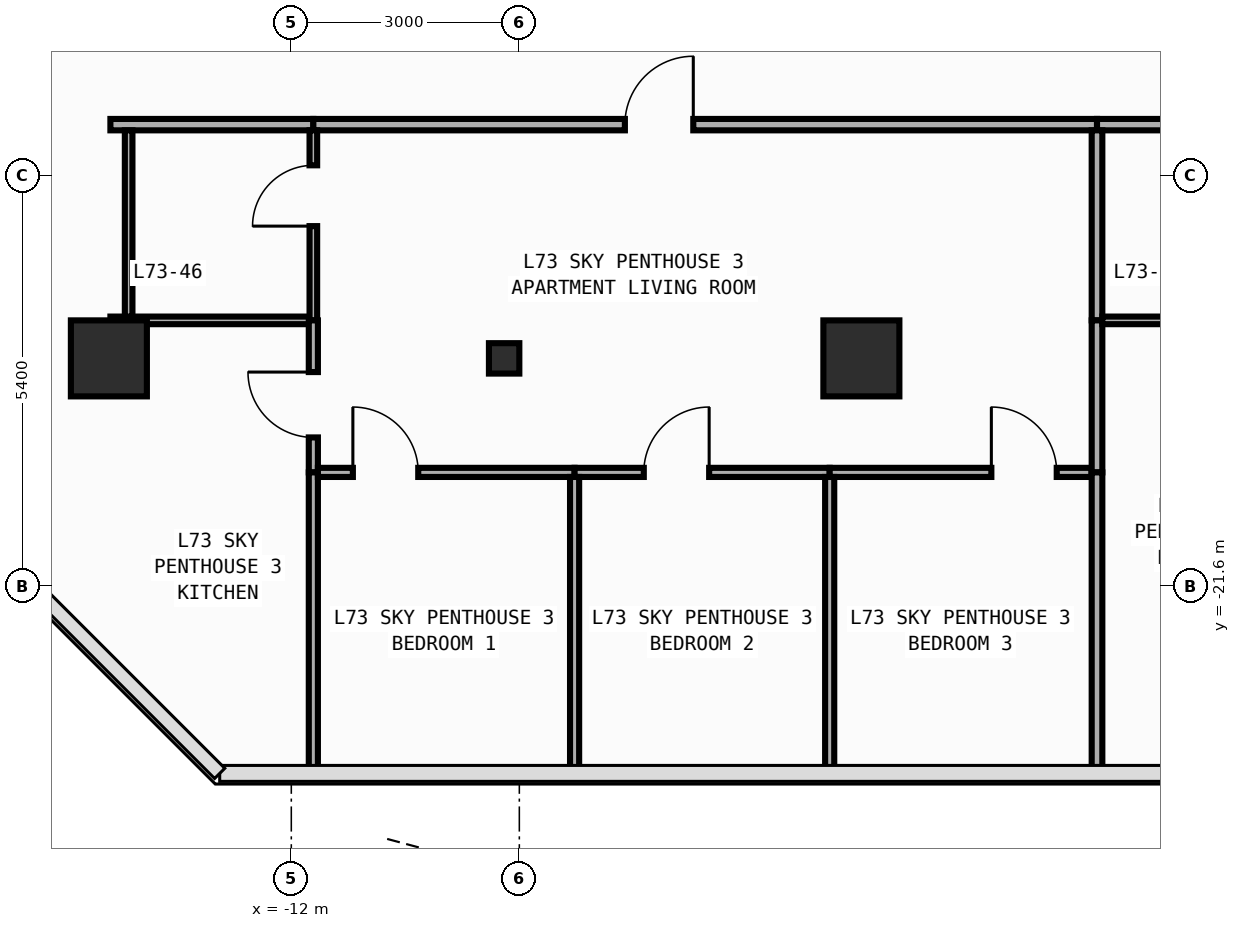
"""IFC4 building model, lengths in metres.
Left out: names, types, materials, properties, quantities, classifications, styles, units other than length and angle.
Written with IfcOpenShell. Run it as: python <this file> out.ifc"""

import sys

from ifc_helpers import new_model, si_unit, direction, frame, frame_2d, origin, origin_2d, place, context, subcontext, project, spatial, rectangle, circle, i_section, extrude, element, fill, save


model = new_model("IFC4")
c1 = context("Model", 3, precision=1e-05, world=origin(), true_north=direction((0.0, 1.0)))
c2 = subcontext(c1, "Body", "Model", "MODEL_VIEW")
j1 = project(units=[si_unit("LENGTHUNIT", "METRE"), si_unit("PLANEANGLEUNIT", "RADIAN")], contexts=[c1])
p1 = place(None, origin())
s1 = spatial("IfcSite", under=j1, at=p1, CompositionType="ELEMENT")
p2 = place(p1, origin())
s2 = spatial("IfcBuilding", under=s1, at=p2, CompositionType="ELEMENT")
p3 = place(p2, frame((0.0, 0.0, 304.2)))
s3 = spatial("IfcBuildingStorey", under=s2, at=p3, CompositionType="ELEMENT", Elevation=304.2)
p4 = place(p3, frame((-9.2, -18.6, 0.0), z_axis=(0.0, 0.0, 1.0), x_axis=(1.0, 0.0, 0.0)))
e1 = element("IfcColumn", 1, at=p4, inside=s3, PredefinedType="COLUMN", context=c2, shape_type="SweptSolid", body=[
    extrude(i_section(OverallWidth=0.4, OverallDepth=0.4, WebThickness=0.013, FlangeThickness=0.021, FilletRadius=0.022, at=origin_2d()), origin(), (0.0, 0.0, 1.0), 3.8),
])
for number, where, z_axis, x_axis in (
    (2, (-14.4, -18.6, 0.0), (0.0, 0.0, 1.0), (1.0, 0.0, 0.0)),
    (3, (-4.5, -18.6, 0.0), (0.0, 0.0, 1.0), (1.0, 0.0, 0.0)),
):
    element("IfcColumn", number, at=place(p3, frame(where, z_axis=z_axis, x_axis=x_axis)), inside=s3, PredefinedType="COLUMN", context=c2, shape_type="SweptSolid", body=[
        extrude(circle(Radius=0.5, at=origin_2d()), origin(), (0.0, 0.0, 1.0), 3.8),
    ])
p5 = place(p3, frame((-14.38, -15.525, 0.0), z_axis=(0.0, 0.0, 1.0), x_axis=(1.0, 0.0, 0.0)))
e4 = element("IfcWall", 4, at=p5, inside=s3, PredefinedType="PARTITIONING", context=c2, shape_type="SweptSolid", body=[
    extrude(rectangle(XDim=2.67, YDim=0.15, at=frame_2d((1.335, 0.0))), origin(), (0.0, 0.0, 1.0), 3.54),
])
p6 = place(p3, frame((-11.71, -15.525, 0.0), z_axis=(0.0, 0.0, 1.0), x_axis=(1.0, 0.0, 0.0)))
e5 = element("IfcWall", 5, at=p6, inside=s3, PredefinedType="PARTITIONING", context=c2, shape_type="SweptSolid", body=[
    extrude(rectangle(XDim=10.31, YDim=0.15, at=frame_2d((5.155, 0.0))), origin(), (0.0, 0.0, 1.0), 3.54),
])
p7 = place(p6, frame((4.099, 0.0, 0.0)))
e6 = element("IfcOpeningElement", 6, at=p7, cuts=e5, PredefinedType="OPENING", context=c2, shape_type="SweptSolid", body=[
    extrude(rectangle(XDim=0.9, YDim=2.15, at=frame_2d((0.45, 1.075))), frame((0.0, 0.085, 0.0), z_axis=(0.0, -1.0, 0.0), x_axis=(1.0, 0.0, 0.0)), (0.0, 0.0, 1.0), 0.17),
])
p8 = place(p3, frame((-1.4, -15.525, 0.0), z_axis=(0.0, 0.0, 1.0), x_axis=(1.0, 0.0, 0.0)))
e7 = element("IfcWall", 7, at=p8, inside=s3, PredefinedType="PARTITIONING", context=c2, shape_type="SweptSolid", body=[
    extrude(rectangle(XDim=2.59, YDim=0.15, at=frame_2d((1.295, 0.0))), origin(), (0.0, 0.0, 1.0), 3.54),
])
p9 = place(p3, frame((-14.38, -18.1, 0.0), z_axis=(0.0, 0.0, 1.0), x_axis=(1.0, 0.0, 0.0)))
e8 = element("IfcWall", 8, at=p9, inside=s3, PredefinedType="PARTITIONING", context=c2, shape_type="SweptSolid", body=[
    extrude(rectangle(XDim=2.62, YDim=0.1, at=frame_2d((1.31, 0.0))), origin(), (0.0, 0.0, 1.0), 3.54),
])
p10 = place(p3, frame((-11.71, -18.1, 0.0), z_axis=(0.0, 0.0, 1.0), x_axis=(0.0, 1.0, 0.0)))
e9 = element("IfcWall", 9, at=p10, inside=s3, PredefinedType="PARTITIONING", context=c2, shape_type="SweptSolid", body=[
    extrude(rectangle(XDim=2.5, YDim=0.1, at=frame_2d((1.25, 0.0))), origin(), (0.0, 0.0, 1.0), 3.54),
])
p11 = place(p10, frame((1.24, 0.0, 0.0)))
e10 = element("IfcOpeningElement", 10, at=p11, cuts=e9, PredefinedType="OPENING", context=c2, shape_type="SweptSolid", body=[
    extrude(rectangle(XDim=0.8, YDim=2.1, at=frame_2d((0.4, 1.05))), frame((0.0, 0.06, 0.0), z_axis=(0.0, -1.0, 0.0), x_axis=(1.0, 0.0, 0.0)), (0.0, 0.0, 1.0), 0.12),
])
p12 = place(p3, frame((-11.71, -20.1, 0.0), z_axis=(0.0, 0.0, 1.0), x_axis=(0.0, 1.0, 0.0)))
e11 = element("IfcWall", 11, at=p12, inside=s3, PredefinedType="PARTITIONING", context=c2, shape_type="SweptSolid", body=[
    extrude(rectangle(XDim=2.0, YDim=0.12, at=frame_2d((1.0, 0.0))), origin(), (0.0, 0.0, 1.0), 3.54),
])
p13 = place(p12, frame((0.46, 0.0, 0.0)))
e12 = element("IfcOpeningElement", 12, at=p13, cuts=e11, PredefinedType="OPENING", context=c2, shape_type="SweptSolid", body=[
    extrude(rectangle(XDim=0.86, YDim=2.15, at=frame_2d((0.43, 1.075))), frame((0.0, 0.07, 0.0), z_axis=(0.0, -1.0, 0.0), x_axis=(1.0, 0.0, 0.0)), (0.0, 0.0, 1.0), 0.14),
])
p14 = place(p3, frame((-11.71, -24.055, 0.0), z_axis=(0.0, 0.0, 1.0), x_axis=(0.0, 1.0, 0.0)))
e13 = element("IfcWall", 13, at=p14, inside=s3, PredefinedType="PARTITIONING", context=c2, shape_type="SweptSolid", body=[
    extrude(rectangle(XDim=3.955, YDim=0.12, at=frame_2d((1.978, 0.0))), origin(), (0.0, 0.0, 1.0), 3.54),
])
p15 = place(p3, frame((-11.65, -20.1, 0.0), z_axis=(0.0, 0.0, 1.0), x_axis=(1.0, 0.0, 0.0)))
e14 = element("IfcWall", 14, at=p15, inside=s3, PredefinedType="PARTITIONING", context=c2, shape_type="SweptSolid", body=[
    extrude(rectangle(XDim=3.377, YDim=0.12, at=frame_2d((1.688, 0.0))), origin(), (0.0, 0.0, 1.0), 3.54),
])
p16 = place(p15, frame((0.46, 0.0, 0.0)))
e15 = element("IfcOpeningElement", 15, at=p16, cuts=e14, PredefinedType="OPENING", context=c2, shape_type="SweptSolid", body=[
    extrude(rectangle(XDim=0.86, YDim=2.15, at=frame_2d((0.43, 1.075))), frame((0.0, 0.07, 0.0), z_axis=(0.0, -1.0, 0.0), x_axis=(1.0, 0.0, 0.0)), (0.0, 0.0, 1.0), 0.14),
])
p17 = place(p3, frame((-8.273, -20.1, 0.0), z_axis=(0.0, 0.0, 1.0), x_axis=(1.0, 0.0, 0.0)))
e16 = element("IfcWall", 16, at=p17, inside=s3, PredefinedType="PARTITIONING", context=c2, shape_type="SweptSolid", body=[
    extrude(rectangle(XDim=3.356, YDim=0.12, at=frame_2d((1.678, 0.0))), origin(), (0.0, 0.0, 1.0), 3.54),
])
p18 = place(p17, frame((0.91, 0.0, 0.0)))
e17 = element("IfcOpeningElement", 17, at=p18, cuts=e16, PredefinedType="OPENING", context=c2, shape_type="SweptSolid", body=[
    extrude(rectangle(XDim=0.86, YDim=2.15, at=frame_2d((0.43, 1.075))), frame((0.0, 0.07, 0.0), z_axis=(0.0, -1.0, 0.0), x_axis=(1.0, 0.0, 0.0)), (0.0, 0.0, 1.0), 0.14),
])
p19 = place(p3, frame((-4.917, -20.1, 0.0), z_axis=(0.0, 0.0, 1.0), x_axis=(1.0, 0.0, 0.0)))
e18 = element("IfcWall", 18, at=p19, inside=s3, PredefinedType="PARTITIONING", context=c2, shape_type="SweptSolid", body=[
    extrude(rectangle(XDim=3.447, YDim=0.12, at=frame_2d((1.724, 0.0))), origin(), (0.0, 0.0, 1.0), 3.54),
])
p20 = place(p19, frame((2.127, 0.0, 0.0)))
e19 = element("IfcOpeningElement", 19, at=p20, cuts=e18, PredefinedType="OPENING", context=c2, shape_type="SweptSolid", body=[
    extrude(rectangle(XDim=0.86, YDim=2.15, at=frame_2d((0.43, 1.075))), frame((0.0, 0.07, 0.0), z_axis=(0.0, -1.0, 0.0), x_axis=(1.0, 0.0, 0.0)), (0.0, 0.0, 1.0), 0.14),
])
p21 = place(p3, frame((-1.4, -18.1, 0.0), z_axis=(0.0, 0.0, 1.0), x_axis=(0.0, 1.0, 0.0)))
e20 = element("IfcWall", 20, at=p21, inside=s3, PredefinedType="PARTITIONING", context=c2, shape_type="SweptSolid", body=[
    extrude(rectangle(XDim=2.5, YDim=0.14, at=frame_2d((1.25, 0.0))), origin(), (0.0, 0.0, 1.0), 3.54),
])
p22 = place(p3, frame((-1.4, -20.1, 0.0), z_axis=(0.0, 0.0, 1.0), x_axis=(0.0, 1.0, 0.0)))
e21 = element("IfcWall", 21, at=p22, inside=s3, PredefinedType="PARTITIONING", context=c2, shape_type="SweptSolid", body=[
    extrude(rectangle(XDim=2.0, YDim=0.14, at=frame_2d((1.0, 0.0))), origin(), (0.0, 0.0, 1.0), 3.54),
])
for number, where, z_axis, x_axis in (
    (22, (-8.273, -24.055, 0.0), (0.0, 0.0, 1.0), (0.0, 1.0, 0.0)),
    (23, (-4.917, -24.055, 0.0), (0.0, 0.0, 1.0), (0.0, 1.0, 0.0)),
):
    element("IfcWall", number, at=place(p3, frame(where, z_axis=z_axis, x_axis=x_axis)), inside=s3, PredefinedType="PARTITIONING", context=c2, shape_type="SweptSolid", body=[
        extrude(rectangle(XDim=3.895, YDim=0.12, at=frame_2d((1.948, 0.0))), origin(), (0.0, 0.0, 1.0), 3.54),
    ])
p23 = place(p3, frame((-1.4, -24.055, 0.0), z_axis=(0.0, 0.0, 1.0), x_axis=(0.0, 1.0, 0.0)))
e24 = element("IfcWall", 24, at=p23, inside=s3, PredefinedType="PARTITIONING", context=c2, shape_type="SweptSolid", body=[
    extrude(rectangle(XDim=3.955, YDim=0.14, at=frame_2d((1.978, 0.0))), origin(), (0.0, 0.0, 1.0), 3.54),
])
p24 = place(p3, frame((-1.33, -18.1, 0.0), z_axis=(0.0, 0.0, 1.0), x_axis=(1.0, 0.0, 0.0)))
e25 = element("IfcWall", 25, at=p24, inside=s3, PredefinedType="PARTITIONING", context=c2, shape_type="SweptSolid", body=[
    extrude(rectangle(XDim=2.47, YDim=0.1, at=frame_2d((1.235, 0.0))), origin(), (0.0, 0.0, 1.0), 3.54),
])
p25 = place(p3, frame((-14.14, -18.05, 0.0), z_axis=(0.0, 0.0, 1.0), x_axis=(0.0, 1.0, 0.0)))
e26 = element("IfcWall", 26, at=p25, inside=s3, PredefinedType="PARTITIONING", context=c2, shape_type="SweptSolid", body=[
    extrude(rectangle(XDim=2.45, YDim=0.1, at=frame_2d((1.225, 0.0))), origin(), (0.0, 0.0, 1.0), 2.64),
])
p26 = place(p7, origin())
e27 = element("IfcDoor", 27, at=p26, inside=s3, OperationType="SINGLE_SWING_RIGHT", PredefinedType="DOOR", context=c2, shape_type="SweptSolid", body=[
    extrude(rectangle(XDim=0.9, YDim=2.15, at=frame_2d((0.45, 1.075))), frame((0.0, 0.025, 0.0), z_axis=(0.0, -1.0, 0.0), x_axis=(1.0, 0.0, 0.0)), (0.0, 0.0, 1.0), 0.05),
])
fill(e6, e27)
p27 = place(p11, origin())
e28 = element("IfcDoor", 28, at=p27, inside=s3, OperationType="SINGLE_SWING_LEFT", PredefinedType="DOOR", context=c2, shape_type="SweptSolid", body=[
    extrude(rectangle(XDim=0.8, YDim=2.1, at=frame_2d((0.4, 1.05))), frame((0.0, 0.025, 0.0), z_axis=(0.0, -1.0, 0.0), x_axis=(1.0, 0.0, 0.0)), (0.0, 0.0, 1.0), 0.05),
])
fill(e10, e28)
p28 = place(p13, origin())
e29 = element("IfcDoor", 29, at=p28, inside=s3, OperationType="SINGLE_SWING_RIGHT", PredefinedType="DOOR", context=c2, shape_type="SweptSolid", body=[
    extrude(rectangle(XDim=0.86, YDim=2.15, at=frame_2d((0.43, 1.075))), frame((0.0, 0.025, 0.0), z_axis=(0.0, -1.0, 0.0), x_axis=(1.0, 0.0, 0.0)), (0.0, 0.0, 1.0), 0.05),
])
fill(e12, e29)
p29 = place(p16, origin())
e30 = element("IfcDoor", 30, at=p29, inside=s3, OperationType="SINGLE_SWING_LEFT", PredefinedType="DOOR", context=c2, shape_type="SweptSolid", body=[
    extrude(rectangle(XDim=0.86, YDim=2.15, at=frame_2d((0.43, 1.075))), frame((0.0, 0.025, 0.0), z_axis=(0.0, -1.0, 0.0), x_axis=(1.0, 0.0, 0.0)), (0.0, 0.0, 1.0), 0.05),
])
fill(e15, e30)
p30 = place(p18, origin())
e31 = element("IfcDoor", 31, at=p30, inside=s3, OperationType="SINGLE_SWING_RIGHT", PredefinedType="DOOR", context=c2, shape_type="SweptSolid", body=[
    extrude(rectangle(XDim=0.86, YDim=2.15, at=frame_2d((0.43, 1.075))), frame((0.0, 0.025, 0.0), z_axis=(0.0, -1.0, 0.0), x_axis=(1.0, 0.0, 0.0)), (0.0, 0.0, 1.0), 0.05),
])
fill(e17, e31)
p31 = place(p20, origin())
e32 = element("IfcDoor", 32, at=p31, inside=s3, OperationType="SINGLE_SWING_LEFT", PredefinedType="DOOR", context=c2, shape_type="SweptSolid", body=[
    extrude(rectangle(XDim=0.86, YDim=2.15, at=frame_2d((0.43, 1.075))), frame((0.0, 0.025, 0.0), z_axis=(0.0, -1.0, 0.0), x_axis=(1.0, 0.0, 0.0)), (0.0, 0.0, 1.0), 0.05),
])
fill(e19, e32)
save(model, sys.argv[1])
